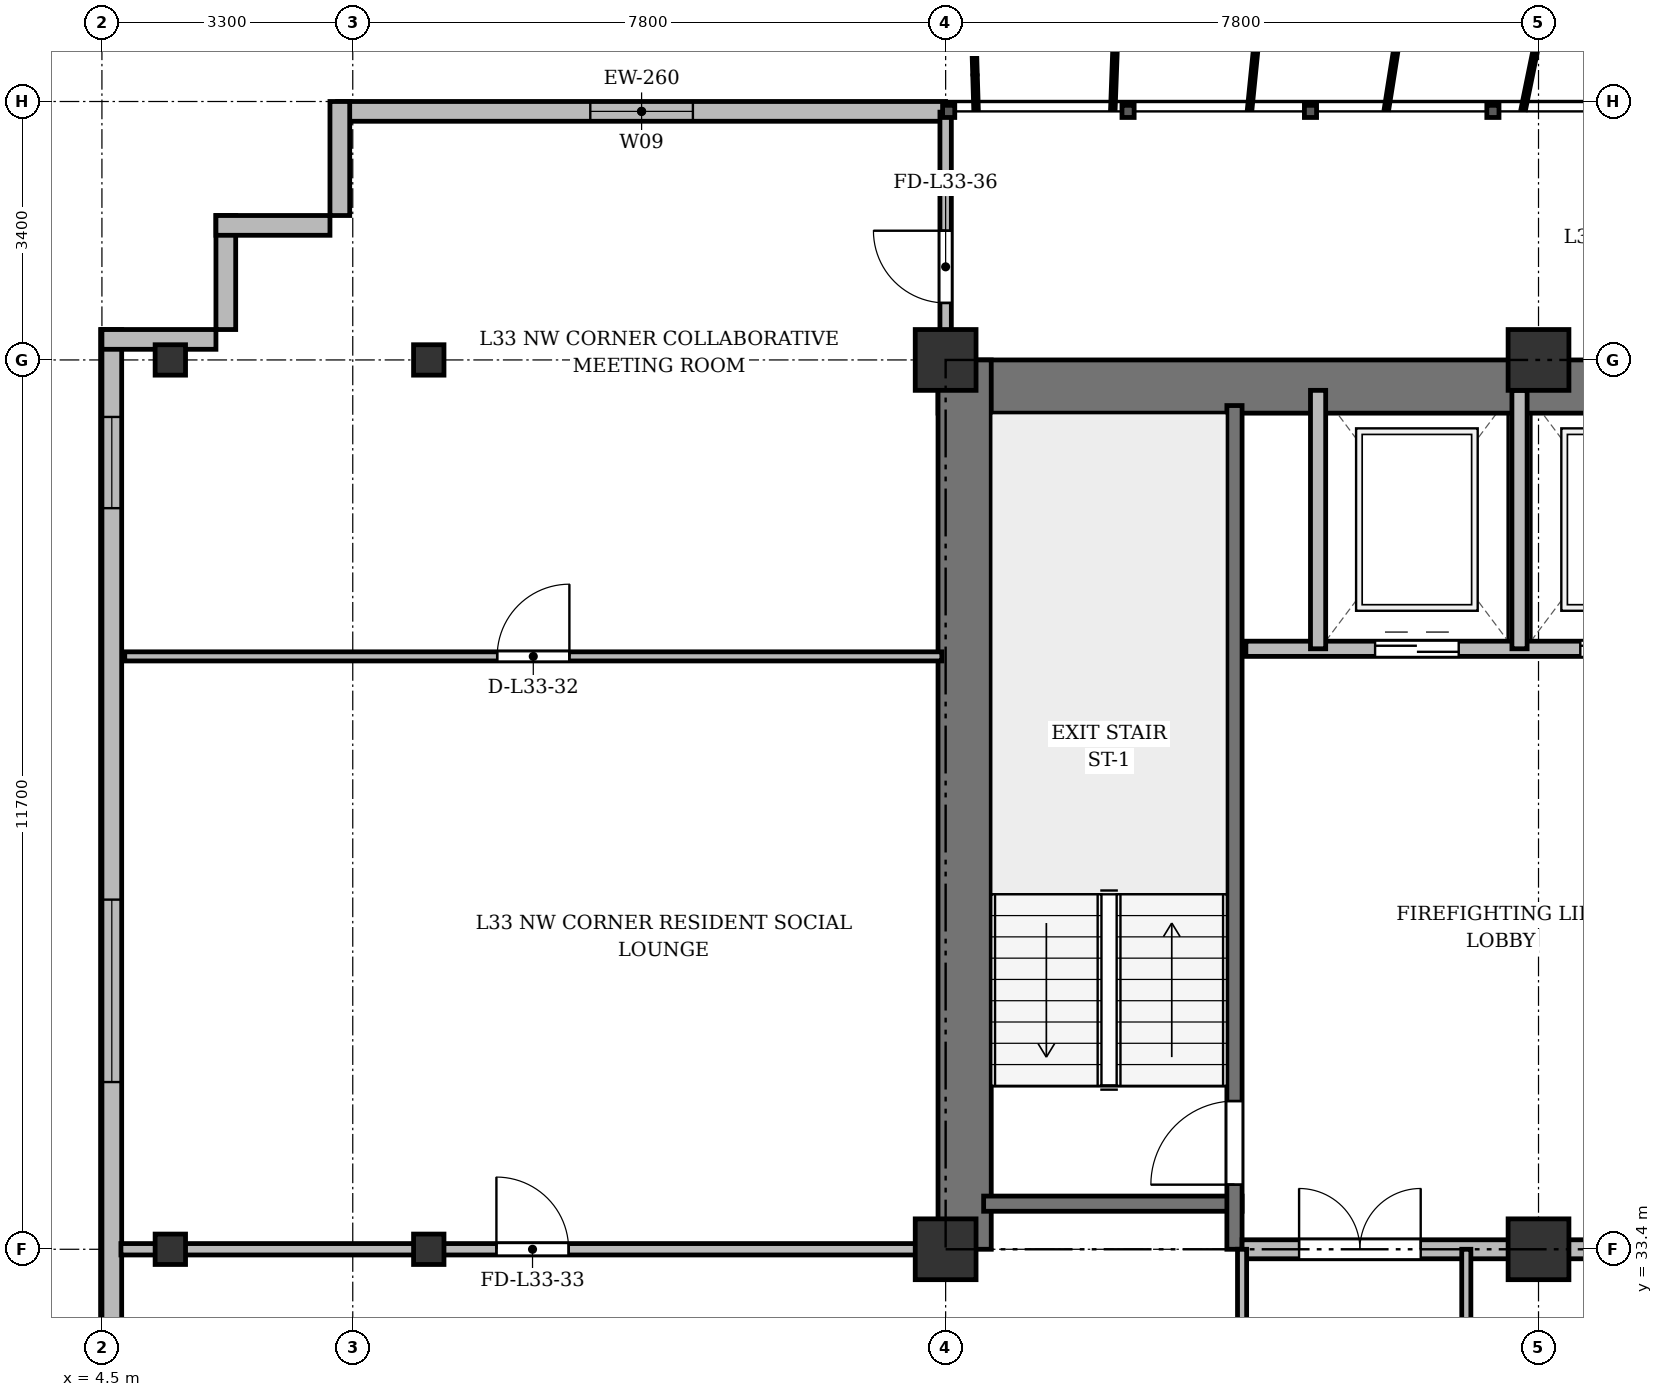
"""IFC4 building model, lengths in metres.
Left out: names, types, materials, properties, quantities, classifications, styles, units other than length and angle.
Written with IfcOpenShell. Run it as: python <this file> out.ifc"""

import sys

from ifc_helpers import new_model, si_unit, direction, frame, frame_2d, origin, origin_2d, place, context, subcontext, project, spatial, rectangle, i_section, extrude, source, transform, mapped, element, fill, save


model = new_model("IFC4")
c1 = context("Model", 3, precision=1e-05, world=origin(), true_north=direction((0.0, 1.0)))
c2 = subcontext(c1, "Body", "Model", "MODEL_VIEW")
j1 = project(units=[si_unit("LENGTHUNIT", "METRE"), si_unit("PLANEANGLEUNIT", "RADIAN")], contexts=[c1])
p1 = place(None, origin())
s1 = spatial("IfcSite", under=j1, at=p1, CompositionType="ELEMENT")
p2 = place(p1, origin())
s2 = spatial("IfcBuilding", under=s1, at=p2, CompositionType="ELEMENT")
p3 = place(p2, frame((0.0, 0.0, 128.5)))
s3 = spatial("IfcBuildingStorey", under=s2, at=p3, CompositionType="ELEMENT", Elevation=128.5)
m1 = source(origin(), c2, "Body", "SweptSolid", [
    extrude(i_section(OverallWidth=0.4, OverallDepth=0.4, WebThickness=0.022, FlangeThickness=0.035, at=origin_2d()), origin(), (0.0, 0.0, 1.0), 3.6),
])
for number, where, z_axis, x_axis in (
    (1, (5.4, 33.4, 0.0), (0.0, 0.0, 1.0), (1.0, 0.0, 0.0)),
    (2, (5.4, 45.1, 0.0), (0.0, 0.0, 1.0), (1.0, 0.0, 0.0)),
    (3, (8.8, 33.4, 0.0), (0.0, 0.0, 1.0), (1.0, 0.0, 0.0)),
    (4, (8.8, 45.1, 0.0), (0.0, 0.0, 1.0), (1.0, 0.0, 0.0)),
):
    element("IfcColumn", number, at=place(p3, frame(where, z_axis=z_axis, x_axis=x_axis)), inside=s3, PredefinedType="COLUMN", context=c2, shape_type="MappedRepresentation", body=[
        mapped(m1, transform((0.0, 0.0, 0.0), x_axis=(1.0, 0.0, 0.0), y_axis=(0.0, 1.0, 0.0), z_axis=(0.0, 0.0, 1.0), scale=1.0)),
    ])
m2 = source(origin(), c2, "Body", "SweptSolid", [
    extrude(rectangle(XDim=0.8, YDim=0.8, at=origin_2d()), origin(), (0.0, 0.0, 1.0), 3.6),
])
for number, where, z_axis, x_axis in (
    (5, (15.6, 33.4, 0.0), (0.0, 0.0, 1.0), (1.0, 0.0, 0.0)),
    (6, (15.6, 45.1, 0.0), (0.0, 0.0, 1.0), (1.0, 0.0, 0.0)),
    (7, (23.4, 33.4, 0.0), (0.0, 0.0, 1.0), (1.0, 0.0, 0.0)),
    (8, (23.4, 45.1, 0.0), (0.0, 0.0, 1.0), (1.0, 0.0, 0.0)),
):
    element("IfcColumn", number, at=place(p3, frame(where, z_axis=z_axis, x_axis=x_axis)), inside=s3, PredefinedType="COLUMN", context=c2, shape_type="MappedRepresentation", body=[
        mapped(m2, transform((0.0, 0.0, 0.0), x_axis=(1.0, 0.0, 0.0), y_axis=(0.0, 1.0, 0.0), z_axis=(0.0, 0.0, 1.0), scale=1.0)),
    ])
p4 = place(p3, frame((7.6, 48.37, 0.0), z_axis=(0.0, 0.0, 1.0), x_axis=(1.0, 0.0, 0.0)))
e9 = element("IfcWall", 9, at=p4, inside=s3, PredefinedType="SOLIDWALL", context=c2, shape_type="SweptSolid", body=[
    extrude(rectangle(XDim=8.0, YDim=0.26, at=frame_2d((4.0, 0.0))), origin(), (0.0, 0.0, 1.0), 3.22),
])
p5 = place(p4, frame((3.325, 0.0, 0.9)))
e10 = element("IfcOpeningElement", 10, at=p5, cuts=e9, PredefinedType="OPENING", context=c2, shape_type="SweptSolid", body=[
    extrude(rectangle(XDim=1.35, YDim=1.5, at=frame_2d((0.675, 0.75))), frame((0.0, 0.14, 0.0), z_axis=(0.0, -1.0, 0.0), x_axis=(1.0, 0.0, 0.0)), (0.0, 0.0, 1.0), 0.28),
])
p6 = place(p3, frame((4.63, 5.9, 0.0), z_axis=(0.0, 0.0, 1.0), x_axis=(0.0, 1.0, 0.0)))
e11 = element("IfcWall", 11, at=p6, inside=s3, PredefinedType="SOLIDWALL", context=c2, shape_type="SweptSolid", body=[
    extrude(rectangle(XDim=39.6, YDim=0.26, at=frame_2d((19.8, 0.0))), origin(), (0.0, 0.0, 1.0), 2.632),
])
p7 = place(p6, frame((1.45, 0.0, 0.92)))
e12 = element("IfcOpeningElement", 12, at=p7, cuts=e11, PredefinedType="OPENING", context=c2, shape_type="SweptSolid", body=[
    extrude(rectangle(XDim=1.2, YDim=1.61, at=frame_2d((0.6, 0.805))), frame((0.0, 0.14, 0.0), z_axis=(0.0, -1.0, 0.0), x_axis=(1.0, 0.0, 0.0)), (0.0, 0.0, 1.0), 0.28),
])
p8 = place(p6, frame((4.3, 0.0, 0.92)))
e13 = element("IfcOpeningElement", 13, at=p8, cuts=e11, PredefinedType="OPENING", context=c2, shape_type="SweptSolid", body=[
    extrude(rectangle(XDim=2.4, YDim=1.61, at=frame_2d((1.2, 0.805))), frame((0.0, 0.14, 0.0), z_axis=(0.0, -1.0, 0.0), x_axis=(1.0, 0.0, 0.0)), (0.0, 0.0, 1.0), 0.28),
])
p9 = place(p6, frame((8.5, 0.0, 0.92)))
e14 = element("IfcOpeningElement", 14, at=p9, cuts=e11, PredefinedType="OPENING", context=c2, shape_type="SweptSolid", body=[
    extrude(rectangle(XDim=2.4, YDim=1.61, at=frame_2d((1.2, 0.805))), frame((0.0, 0.14, 0.0), z_axis=(0.0, -1.0, 0.0), x_axis=(1.0, 0.0, 0.0)), (0.0, 0.0, 1.0), 0.28),
])
p10 = place(p6, frame((29.7, 0.0, 0.92)))
e15 = element("IfcOpeningElement", 15, at=p10, cuts=e11, PredefinedType="OPENING", context=c2, shape_type="SweptSolid", body=[
    extrude(rectangle(XDim=2.4, YDim=1.61, at=frame_2d((1.2, 0.805))), frame((0.0, 0.14, 0.0), z_axis=(0.0, -1.0, 0.0), x_axis=(1.0, 0.0, 0.0)), (0.0, 0.0, 1.0), 0.28),
])
p11 = place(p6, frame((37.25, 0.0, 0.92)))
e16 = element("IfcOpeningElement", 16, at=p11, cuts=e11, PredefinedType="OPENING", context=c2, shape_type="SweptSolid", body=[
    extrude(rectangle(XDim=1.2, YDim=1.61, at=frame_2d((0.6, 0.805))), frame((0.0, 0.14, 0.0), z_axis=(0.0, -1.0, 0.0), x_axis=(1.0, 0.0, 0.0)), (0.0, 0.0, 1.0), 0.28),
])
p12 = place(p3, frame((4.5, 45.37, 0.0), z_axis=(0.0, 0.0, 1.0), x_axis=(1.0, 0.0, 0.0)))
e17 = element("IfcWall", 17, at=p12, inside=s3, PredefinedType="SOLIDWALL", context=c2, shape_type="SweptSolid", body=[
    extrude(rectangle(XDim=1.5, YDim=0.26, at=frame_2d((0.75, 0.0))), origin(), (0.0, 0.0, 1.0), 2.632),
])
for number, where, z_axis, x_axis in (
    (18, (6.13, 45.5, 0.0), (0.0, 0.0, 1.0), (0.0, 1.0, 0.0)),
    (19, (6.0, 46.87, 0.0), (0.0, 0.0, 1.0), (1.0, 0.0, 0.0)),
    (20, (7.63, 47.0, 0.0), (0.0, 0.0, 1.0), (0.0, 1.0, 0.0)),
):
    element("IfcWall", number, at=place(p3, frame(where, z_axis=z_axis, x_axis=x_axis)), inside=s3, PredefinedType="SOLIDWALL", context=c2, shape_type="SweptSolid", body=[
        extrude(rectangle(XDim=1.5, YDim=0.26, at=frame_2d((0.75, 0.0))), origin(), (0.0, 0.0, 1.0), 3.22),
    ])
p13 = place(p3, frame((15.5, 44.75, 0.0), z_axis=(0.0, 0.0, 1.0), x_axis=(1.0, 0.0, 0.0)))
e21 = element("IfcWall", 21, at=p13, inside=s3, PredefinedType="SHEAR", context=c2, shape_type="SweptSolid", body=[
    extrude(rectangle(XDim=43.4, YDim=0.7, at=frame_2d((21.7, 0.0))), origin(), (0.0, 0.0, 1.0), 3.22),
])
p14 = place(p3, frame((15.85, 33.4, 0.0), z_axis=(0.0, 0.0, 1.0), x_axis=(0.0, 1.0, 0.0)))
e22 = element("IfcWall", 22, at=p14, inside=s3, PredefinedType="SHEAR", context=c2, shape_type="SweptSolid", body=[
    extrude(rectangle(XDim=11.7, YDim=0.7, at=frame_2d((5.85, 0.0))), origin(), (0.0, 0.0, 1.0), 3.22),
])
p15 = place(p3, frame((16.1, 34.0, 0.0), z_axis=(0.0, 0.0, 1.0), x_axis=(1.0, 0.0, 0.0)))
e23 = element("IfcWall", 23, at=p15, inside=s3, PredefinedType="SHEAR", context=c2, shape_type="SweptSolid", body=[
    extrude(rectangle(XDim=3.4, YDim=0.2, at=frame_2d((1.7, 0.0))), origin(), (0.0, 0.0, 1.0), 3.22),
])
p16 = place(p3, frame((19.4, 33.4, 0.0), z_axis=(0.0, 0.0, 1.0), x_axis=(0.0, 1.0, 0.0)))
e24 = element("IfcWall", 24, at=p16, inside=s3, PredefinedType="SHEAR", context=c2, shape_type="SweptSolid", body=[
    extrude(rectangle(XDim=11.1, YDim=0.2, at=frame_2d((5.55, 0.0))), origin(), (0.0, 0.0, 1.0), 3.22),
])
p17 = place(p16, frame((0.85, 0.0, 0.0)))
e25 = element("IfcOpeningElement", 25, at=p17, cuts=e24, PredefinedType="OPENING", context=c2, shape_type="SweptSolid", body=[
    extrude(rectangle(XDim=1.1, YDim=2.15, at=frame_2d((0.55, 1.075))), frame((0.0, 0.11, 0.0), z_axis=(0.0, -1.0, 0.0), x_axis=(1.0, 0.0, 0.0)), (0.0, 0.0, 1.0), 0.22),
])
p18 = place(p3, frame((19.55, 41.3, 0.0), z_axis=(0.0, 0.0, 1.0), x_axis=(1.0, 0.0, 0.0)))
e26 = element("IfcWall", 26, at=p18, inside=s3, PredefinedType="SOLIDWALL", context=c2, shape_type="SweptSolid", body=[
    extrude(rectangle(XDim=6.75, YDim=0.2, at=frame_2d((3.375, 0.0))), origin(), (0.0, 0.0, 1.0), 3.22),
])
p19 = place(p18, frame((1.7, 0.0, 0.0)))
e27 = element("IfcOpeningElement", 27, at=p19, cuts=e26, PredefinedType="OPENING", context=c2, shape_type="SweptSolid", body=[
    extrude(rectangle(XDim=1.1, YDim=2.15, at=frame_2d((0.55, 1.075))), frame((0.0, 0.11, 0.0), z_axis=(0.0, -1.0, 0.0), x_axis=(1.0, 0.0, 0.0)), (0.0, 0.0, 1.0), 0.22),
])
p20 = place(p18, frame((4.4, 0.0, 0.0)))
e28 = element("IfcOpeningElement", 28, at=p20, cuts=e26, PredefinedType="OPENING", context=c2, shape_type="SweptSolid", body=[
    extrude(rectangle(XDim=1.1, YDim=2.15, at=frame_2d((0.55, 1.075))), frame((0.0, 0.11, 0.0), z_axis=(0.0, -1.0, 0.0), x_axis=(1.0, 0.0, 0.0)), (0.0, 0.0, 1.0), 0.22),
])
for number, where, z_axis, x_axis in (
    (29, (20.5, 41.3, 0.0), (0.0, 0.0, 1.0), (0.0, 1.0, 0.0)),
    (30, (23.15, 41.3, 0.0), (0.0, 0.0, 1.0), (0.0, 1.0, 0.0)),
):
    element("IfcWall", number, at=place(p3, frame(where, z_axis=z_axis, x_axis=x_axis)), inside=s3, PredefinedType="SOLIDWALL", context=c2, shape_type="SweptSolid", body=[
        extrude(rectangle(XDim=3.4, YDim=0.2, at=frame_2d((1.7, 0.0))), origin(), (0.0, 0.0, 1.0), 3.22),
    ])
p21 = place(p3, frame((19.5, 33.4, 0.0), z_axis=(0.0, 0.0, 1.0), x_axis=(1.0, 0.0, 0.0)))
e31 = element("IfcWall", 31, at=p21, inside=s3, PredefinedType="PARTITIONING", context=c2, shape_type="SweptSolid", body=[
    extrude(rectangle(XDim=6.8, YDim=0.25, at=frame_2d((3.4, 0.0))), origin(), (0.0, 0.0, 1.0), 2.632),
])
p22 = place(p21, frame((0.75, 0.0, 0.0)))
e32 = element("IfcOpeningElement", 32, at=p22, cuts=e31, PredefinedType="OPENING", context=c2, shape_type="SweptSolid", body=[
    extrude(rectangle(XDim=1.6, YDim=2.2, at=frame_2d((0.8, 1.1))), frame((0.0, 0.135, 0.0), z_axis=(0.0, -1.0, 0.0), x_axis=(1.0, 0.0, 0.0)), (0.0, 0.0, 1.0), 0.27),
])
for number, where, z_axis, x_axis in (
    (33, (19.5, 29.8, 0.0), (0.0, 0.0, 1.0), (0.0, 1.0, 0.0)),
    (34, (22.45, 29.8, 0.0), (0.0, 0.0, 1.0), (0.0, 1.0, 0.0)),
):
    element("IfcWall", number, at=place(p3, frame(where, z_axis=z_axis, x_axis=x_axis)), inside=s3, PredefinedType="PARTITIONING", context=c2, shape_type="SweptSolid", body=[
        extrude(rectangle(XDim=3.6, YDim=0.12, at=frame_2d((1.8, 0.0))), origin(), (0.0, 0.0, 1.0), 2.632),
    ])
p23 = place(p3, frame((4.8, 41.2, 0.0), z_axis=(0.0, 0.0, 1.0), x_axis=(1.0, 0.0, 0.0)))
e35 = element("IfcWall", 35, at=p23, inside=s3, PredefinedType="PARTITIONING", context=c2, shape_type="SweptSolid", body=[
    extrude(rectangle(XDim=10.75, YDim=0.12, at=frame_2d((5.375, 0.0))), origin(), (0.0, 0.0, 1.0), 2.72),
])
p24 = place(p23, frame((4.9, 0.0, 0.0)))
e36 = element("IfcOpeningElement", 36, at=p24, cuts=e35, PredefinedType="OPENING", context=c2, shape_type="SweptSolid", body=[
    extrude(rectangle(XDim=0.95, YDim=2.15, at=frame_2d((0.475, 1.075))), frame((0.0, 0.07, 0.0), z_axis=(0.0, -1.0, 0.0), x_axis=(1.0, 0.0, 0.0)), (0.0, 0.0, 1.0), 0.14),
])
p25 = place(p3, frame((4.75, 33.4, 0.0), z_axis=(0.0, 0.0, 1.0), x_axis=(1.0, 0.0, 0.0)))
e37 = element("IfcWall", 37, at=p25, inside=s3, PredefinedType="PARTITIONING", context=c2, shape_type="SweptSolid", body=[
    extrude(rectangle(XDim=10.85, YDim=0.15, at=frame_2d((5.425, 0.0))), origin(), (0.0, 0.0, 1.0), 2.632),
])
p26 = place(p25, frame((4.94, 0.0, 0.0)))
e38 = element("IfcOpeningElement", 38, at=p26, cuts=e37, PredefinedType="OPENING", context=c2, shape_type="SweptSolid", body=[
    extrude(rectangle(XDim=0.95, YDim=2.15, at=frame_2d((0.475, 1.075))), frame((0.0, 0.085, 0.0), z_axis=(0.0, -1.0, 0.0), x_axis=(1.0, 0.0, 0.0)), (0.0, 0.0, 1.0), 0.17),
])
p27 = place(p3, frame((15.6, 44.75, 0.0), z_axis=(0.0, 0.0, 1.0), x_axis=(0.0, 1.0, 0.0)))
e39 = element("IfcWall", 39, at=p27, inside=s3, PredefinedType="PARTITIONING", context=c2, shape_type="SweptSolid", body=[
    extrude(rectangle(XDim=3.61, YDim=0.15, at=frame_2d((1.805, 0.0))), origin(), (0.0, 0.0, 1.0), 2.72),
])
p28 = place(p27, frame((1.1, 0.0, 0.0)))
e40 = element("IfcOpeningElement", 40, at=p28, cuts=e39, PredefinedType="OPENING", context=c2, shape_type="SweptSolid", body=[
    extrude(rectangle(XDim=0.95, YDim=2.15, at=frame_2d((0.475, 1.075))), frame((0.0, 0.085, 0.0), z_axis=(0.0, -1.0, 0.0), x_axis=(1.0, 0.0, 0.0)), (0.0, 0.0, 1.0), 0.17),
])
m3 = source(origin(), c2, "Body", "SweptSolid", [
    extrude(rectangle(XDim=1.35, YDim=1.5, at=frame_2d((0.675, 0.75))), frame((0.0, 0.03, 0.0), z_axis=(0.0, -1.0, 0.0), x_axis=(1.0, 0.0, 0.0)), (0.0, 0.0, 1.0), 0.06),
])
p29 = place(p5, origin())
e41 = element("IfcWindow", 41, at=p29, inside=s3, PartitioningType="SINGLE_PANEL", PredefinedType="WINDOW", context=c2, shape_type="MappedRepresentation", body=[
    mapped(m3, transform((0.0, 0.0, 0.0), x_axis=(1.0, 0.0, 0.0), y_axis=(0.0, 1.0, 0.0), z_axis=(0.0, 0.0, 1.0), scale=1.0)),
])
fill(e10, e41)
m4 = source(origin(), c2, "Body", "SweptSolid", [
    extrude(rectangle(XDim=2.4, YDim=1.61, at=frame_2d((1.2, 0.805))), frame((0.0, 0.03, 0.0), z_axis=(0.0, -1.0, 0.0), x_axis=(1.0, 0.0, 0.0)), (0.0, 0.0, 1.0), 0.06),
])
p30 = place(p10, origin())
e42 = element("IfcWindow", 42, at=p30, inside=s3, PartitioningType="SINGLE_PANEL", PredefinedType="WINDOW", context=c2, shape_type="MappedRepresentation", body=[
    mapped(m4, transform((0.0, 0.0, 0.0), x_axis=(1.0, 0.0, 0.0), y_axis=(0.0, 1.0, 0.0), z_axis=(0.0, 0.0, 1.0), scale=1.0)),
])
fill(e15, e42)
m5 = source(origin(), c2, "Body", "SweptSolid", [
    extrude(rectangle(XDim=1.2, YDim=1.61, at=frame_2d((0.6, 0.805))), frame((0.0, 0.03, 0.0), z_axis=(0.0, -1.0, 0.0), x_axis=(1.0, 0.0, 0.0)), (0.0, 0.0, 1.0), 0.06),
])
p31 = place(p11, origin())
e43 = element("IfcWindow", 43, at=p31, inside=s3, PartitioningType="SINGLE_PANEL", PredefinedType="WINDOW", context=c2, shape_type="MappedRepresentation", body=[
    mapped(m5, transform((0.0, 0.0, 0.0), x_axis=(1.0, 0.0, 0.0), y_axis=(0.0, 1.0, 0.0), z_axis=(0.0, 0.0, 1.0), scale=1.0)),
])
fill(e16, e43)
m6 = source(origin(), c2, "Body", "SweptSolid", [
    extrude(rectangle(XDim=1.1, YDim=2.15, at=frame_2d((0.55, 1.075))), frame((0.0, 0.025, 0.0), z_axis=(0.0, -1.0, 0.0), x_axis=(1.0, 0.0, 0.0)), (0.0, 0.0, 1.0), 0.05),
])
p32 = place(p17, origin())
e44 = element("IfcDoor", 44, at=p32, inside=s3, OperationType="SINGLE_SWING_LEFT", PredefinedType="DOOR", context=c2, shape_type="MappedRepresentation", body=[
    mapped(m6, transform((0.0, 0.0, 0.0), x_axis=(1.0, 0.0, 0.0), y_axis=(0.0, 1.0, 0.0), z_axis=(0.0, 0.0, 1.0), scale=1.0)),
])
fill(e25, e44)
p33 = place(p19, origin())
e45 = element("IfcDoor", 45, at=p33, inside=s3, OperationType="DOUBLE_DOOR_SLIDING", PredefinedType="DOOR", context=c2, shape_type="MappedRepresentation", body=[
    mapped(m6, transform((0.0, 0.0, 0.0), x_axis=(1.0, 0.0, 0.0), y_axis=(0.0, 1.0, 0.0), z_axis=(0.0, 0.0, 1.0), scale=1.0)),
])
fill(e27, e45)
p34 = place(p20, origin())
e46 = element("IfcDoor", 46, at=p34, inside=s3, OperationType="DOUBLE_DOOR_SLIDING", PredefinedType="DOOR", context=c2, shape_type="MappedRepresentation", body=[
    mapped(m6, transform((0.0, 0.0, 0.0), x_axis=(1.0, 0.0, 0.0), y_axis=(0.0, 1.0, 0.0), z_axis=(0.0, 0.0, 1.0), scale=1.0)),
])
fill(e28, e46)
m7 = source(origin(), c2, "Body", "SweptSolid", [
    extrude(rectangle(XDim=1.6, YDim=2.2, at=frame_2d((0.8, 1.1))), frame((0.0, 0.025, 0.0), z_axis=(0.0, -1.0, 0.0), x_axis=(1.0, 0.0, 0.0)), (0.0, 0.0, 1.0), 0.05),
])
p35 = place(p22, origin())
e47 = element("IfcDoor", 47, at=p35, inside=s3, OperationType="DOUBLE_DOOR_SINGLE_SWING", PredefinedType="DOOR", context=c2, shape_type="MappedRepresentation", body=[
    mapped(m7, transform((0.0, 0.0, 0.0), x_axis=(1.0, 0.0, 0.0), y_axis=(0.0, 1.0, 0.0), z_axis=(0.0, 0.0, 1.0), scale=1.0)),
])
fill(e32, e47)
m8 = source(origin(), c2, "Body", "SweptSolid", [
    extrude(rectangle(XDim=0.95, YDim=2.15, at=frame_2d((0.475, 1.075))), frame((0.0, 0.025, 0.0), z_axis=(0.0, -1.0, 0.0), x_axis=(1.0, 0.0, 0.0)), (0.0, 0.0, 1.0), 0.05),
])
p36 = place(p24, origin())
e48 = element("IfcDoor", 48, at=p36, inside=s3, OperationType="SINGLE_SWING_RIGHT", PredefinedType="DOOR", context=c2, shape_type="MappedRepresentation", body=[
    mapped(m8, transform((0.0, 0.0, 0.0), x_axis=(1.0, 0.0, 0.0), y_axis=(0.0, 1.0, 0.0), z_axis=(0.0, 0.0, 1.0), scale=1.0)),
])
fill(e36, e48)
p37 = place(p26, origin())
e49 = element("IfcDoor", 49, at=p37, inside=s3, OperationType="SINGLE_SWING_LEFT", PredefinedType="DOOR", context=c2, shape_type="MappedRepresentation", body=[
    mapped(m8, transform((0.0, 0.0, 0.0), x_axis=(1.0, 0.0, 0.0), y_axis=(0.0, 1.0, 0.0), z_axis=(0.0, 0.0, 1.0), scale=1.0)),
])
fill(e38, e49)
p38 = place(p28, origin())
e50 = element("IfcDoor", 50, at=p38, inside=s3, OperationType="SINGLE_SWING_RIGHT", PredefinedType="DOOR", context=c2, shape_type="MappedRepresentation", body=[
    mapped(m8, transform((0.0, 0.0, 0.0), x_axis=(1.0, 0.0, 0.0), y_axis=(0.0, 1.0, 0.0), z_axis=(0.0, 0.0, 1.0), scale=1.0)),
])
fill(e40, e50)
save(model, sys.argv[1])
